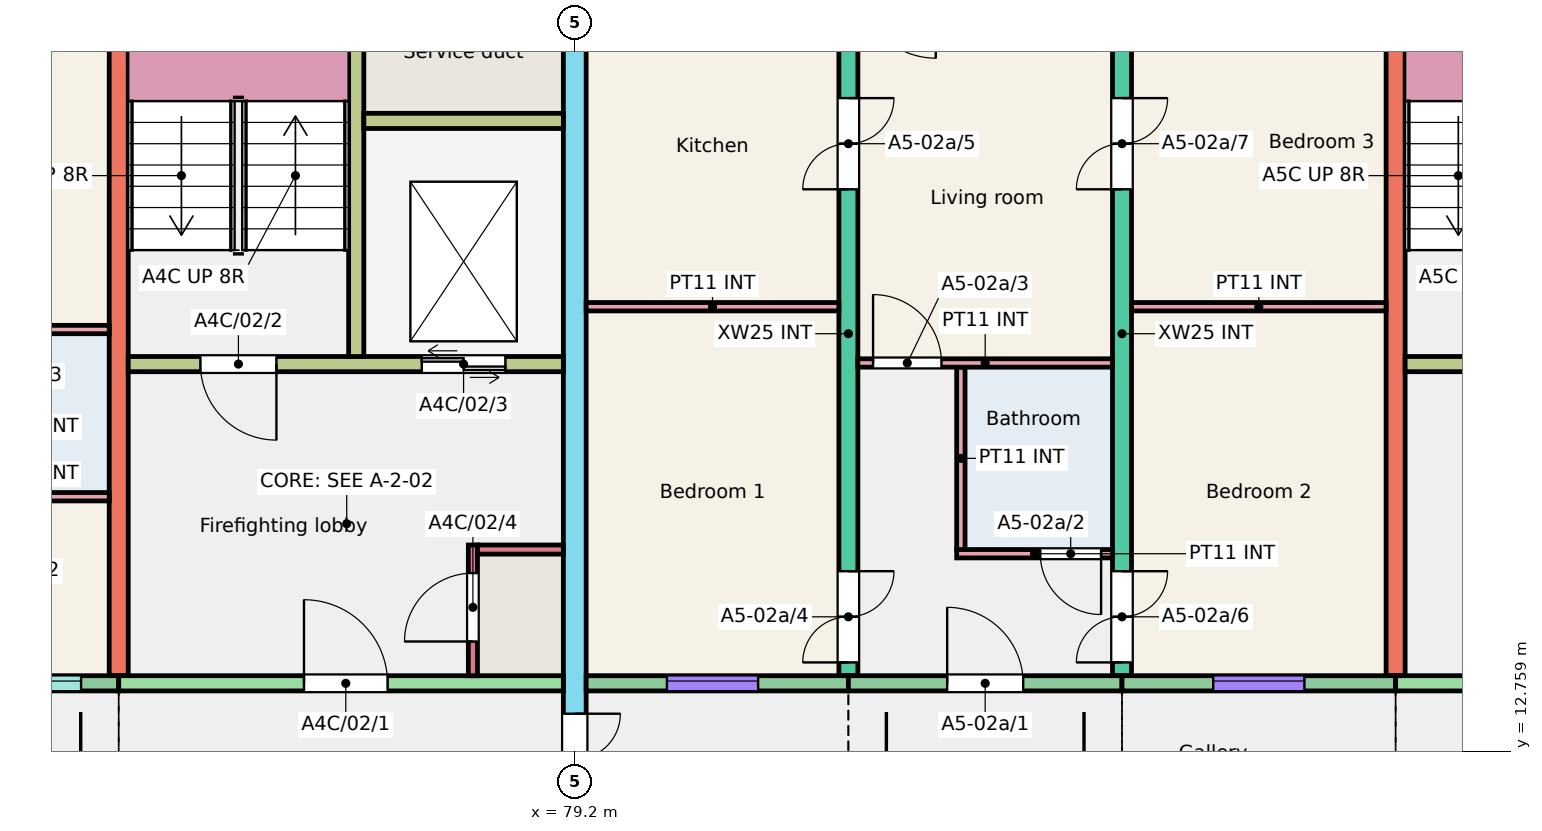
"""IFC4 building model, lengths in metres.
Left out: names, types, materials, properties, quantities, classifications, styles, units other than length and angle.
Written with IfcOpenShell. Run it as: python <this file> out.ifc"""

import sys

from ifc_helpers import new_model, si_unit, direction, frame, frame_2d, origin, place, context, subcontext, project, spatial, rectangle, extrude, element, fill, save


model = new_model("IFC4")
c1 = context("Model", 3, precision=1e-05, world=origin(), true_north=direction((0.0, 1.0)))
c2 = subcontext(c1, "Body", "Model", "MODEL_VIEW")
j1 = project(units=[si_unit("LENGTHUNIT", "METRE"), si_unit("PLANEANGLEUNIT", "RADIAN")], contexts=[c1])
p1 = place(None, origin())
s1 = spatial("IfcSite", under=j1, at=p1, CompositionType="ELEMENT")
p2 = place(p1, origin())
s2 = spatial("IfcBuilding", under=s1, at=p2, CompositionType="ELEMENT")
p3 = place(p2, frame((0.0, 0.0, 6.0)))
s3 = spatial("IfcBuildingStorey", under=s2, at=p3, CompositionType="ELEMENT", Elevation=6.0)
p4 = place(p3, frame((73.2, 13.75, 0.0), z_axis=(0.0, 0.0, 1.0), x_axis=(0.0, 1.0, 0.0)))
e1 = element("IfcWall", 1, at=p4, inside=s3, PredefinedType="SHEAR", context=c2, shape_type="SweptSolid", body=[
    extrude(rectangle(XDim=9.0, YDim=0.25, at=frame_2d((4.5, 0.0))), origin(), (0.0, 0.0, 1.0), 3.0),
])
p5 = place(p3, frame((79.2, 11.75, 0.0), z_axis=(0.0, 0.0, 1.0), x_axis=(0.0, 1.0, 0.0)))
e2 = element("IfcWall", 2, at=p5, inside=s3, PredefinedType="SHEAR", context=c2, shape_type="SweptSolid", body=[
    extrude(rectangle(XDim=11.0, YDim=0.3, at=frame_2d((5.5, 0.0))), origin(), (0.0, 0.0, 1.0), 3.0),
])
p6 = place(p5, frame((0.3, 0.0, 0.0)))
e3 = element("IfcOpeningElement", 3, at=p6, cuts=e2, PredefinedType="OPENING", context=c2, shape_type="SweptSolid", body=[
    extrude(rectangle(XDim=1.2, YDim=2.1, at=frame_2d((0.6, 1.05))), frame((0.0, 0.16, 0.0), z_axis=(0.0, -1.0, 0.0), x_axis=(1.0, 0.0, 0.0)), (0.0, 0.0, 1.0), 0.32),
])
p7 = place(p3, frame((82.8, 13.75, 0.0), z_axis=(0.0, 0.0, 1.0), x_axis=(0.0, 1.0, 0.0)))
e4 = element("IfcWall", 4, at=p7, inside=s3, PredefinedType="SHEAR", context=c2, shape_type="SweptSolid", body=[
    extrude(rectangle(XDim=9.0, YDim=0.25, at=frame_2d((4.5, 0.0))), origin(), (0.0, 0.0, 1.0), 3.0),
])
p8 = place(p7, frame((0.175, 0.0, 0.0)))
e5 = element("IfcOpeningElement", 5, at=p8, cuts=e4, PredefinedType="OPENING", context=c2, shape_type="SweptSolid", body=[
    extrude(rectangle(XDim=1.2, YDim=2.1, at=frame_2d((0.6, 1.05))), frame((0.0, 0.135, 0.0), z_axis=(0.0, -1.0, 0.0), x_axis=(1.0, 0.0, 0.0)), (0.0, 0.0, 1.0), 0.27),
])
p9 = place(p7, frame((6.4, 0.0, 0.0)))
e6 = element("IfcOpeningElement", 6, at=p9, cuts=e4, PredefinedType="OPENING", context=c2, shape_type="SweptSolid", body=[
    extrude(rectangle(XDim=1.2, YDim=2.1, at=frame_2d((0.6, 1.05))), frame((0.0, 0.135, 0.0), z_axis=(0.0, -1.0, 0.0), x_axis=(1.0, 0.0, 0.0)), (0.0, 0.0, 1.0), 0.27),
])
p10 = place(p3, frame((86.4, 13.75, 0.0), z_axis=(0.0, 0.0, 1.0), x_axis=(0.0, 1.0, 0.0)))
e7 = element("IfcWall", 7, at=p10, inside=s3, PredefinedType="SHEAR", context=c2, shape_type="SweptSolid", body=[
    extrude(rectangle(XDim=9.0, YDim=0.25, at=frame_2d((4.5, 0.0))), origin(), (0.0, 0.0, 1.0), 3.0),
])
p11 = place(p10, frame((0.175, 0.0, 0.0)))
e8 = element("IfcOpeningElement", 8, at=p11, cuts=e7, PredefinedType="OPENING", context=c2, shape_type="SweptSolid", body=[
    extrude(rectangle(XDim=1.2, YDim=2.1, at=frame_2d((0.6, 1.05))), frame((0.0, 0.135, 0.0), z_axis=(0.0, -1.0, 0.0), x_axis=(1.0, 0.0, 0.0)), (0.0, 0.0, 1.0), 0.27),
])
p12 = place(p10, frame((6.4, 0.0, 0.0)))
e9 = element("IfcOpeningElement", 9, at=p12, cuts=e7, PredefinedType="OPENING", context=c2, shape_type="SweptSolid", body=[
    extrude(rectangle(XDim=1.2, YDim=2.1, at=frame_2d((0.6, 1.05))), frame((0.0, 0.135, 0.0), z_axis=(0.0, -1.0, 0.0), x_axis=(1.0, 0.0, 0.0)), (0.0, 0.0, 1.0), 0.27),
])
p13 = place(p3, frame((90.0, 13.75, 0.0), z_axis=(0.0, 0.0, 1.0), x_axis=(0.0, 1.0, 0.0)))
e10 = element("IfcWall", 10, at=p13, inside=s3, PredefinedType="SHEAR", context=c2, shape_type="SweptSolid", body=[
    extrude(rectangle(XDim=9.0, YDim=0.25, at=frame_2d((4.5, 0.0))), origin(), (0.0, 0.0, 1.0), 3.0),
])
p14 = place(p3, frame((69.6, 13.65, 0.0), z_axis=(0.0, 0.0, 1.0), x_axis=(1.0, 0.0, 0.0)))
e11 = element("IfcWall", 11, at=p14, inside=s3, PredefinedType="SOLIDWALL", context=c2, shape_type="SweptSolid", body=[
    extrude(rectangle(XDim=3.6, YDim=0.2, at=frame_2d((1.8, 0.0))), origin(), (0.0, 0.0, 1.0), 3.0),
])
p15 = place(p14, frame((1.905, 0.0, 1.1)))
e12 = element("IfcOpeningElement", 12, at=p15, cuts=e11, PredefinedType="OPENING", context=c2, shape_type="SweptSolid", body=[
    extrude(rectangle(XDim=1.2, YDim=1.3, at=frame_2d((0.6, 0.65))), frame((0.0, 0.11, 0.0), z_axis=(0.0, -1.0, 0.0), x_axis=(1.0, 0.0, 0.0)), (0.0, 0.0, 1.0), 0.22),
])
p16 = place(p14, frame((0.275, 0.0, 0.0)))
e13 = element("IfcOpeningElement", 13, at=p16, cuts=e11, PredefinedType="OPENING", context=c2, shape_type="SweptSolid", body=[
    extrude(rectangle(XDim=1.0, YDim=2.1, at=frame_2d((0.5, 1.05))), frame((0.0, 0.11, 0.0), z_axis=(0.0, -1.0, 0.0), x_axis=(1.0, 0.0, 0.0)), (0.0, 0.0, 1.0), 0.22),
])
p17 = place(p3, frame((73.2, 13.65, 0.0), z_axis=(0.0, 0.0, 1.0), x_axis=(1.0, 0.0, 0.0)))
e14 = element("IfcWall", 14, at=p17, inside=s3, PredefinedType="SHEAR", context=c2, shape_type="SweptSolid", body=[
    extrude(rectangle(XDim=5.85, YDim=0.2, at=frame_2d((2.925, 0.0))), origin(), (0.0, 0.0, 1.0), 3.0),
])
p18 = place(p17, frame((2.438, 0.0, 0.0)))
e15 = element("IfcOpeningElement", 15, at=p18, cuts=e14, PredefinedType="OPENING", context=c2, shape_type="SweptSolid", body=[
    extrude(rectangle(XDim=1.1, YDim=2.1, at=frame_2d((0.55, 1.05))), frame((0.0, 0.11, 0.0), z_axis=(0.0, -1.0, 0.0), x_axis=(1.0, 0.0, 0.0)), (0.0, 0.0, 1.0), 0.22),
])
p19 = place(p3, frame((73.325, 17.85, 0.0), z_axis=(0.0, 0.0, 1.0), x_axis=(1.0, 0.0, 0.0)))
e16 = element("IfcWall", 16, at=p19, inside=s3, PredefinedType="SHEAR", context=c2, shape_type="SweptSolid", body=[
    extrude(rectangle(XDim=5.725, YDim=0.2, at=frame_2d((2.863, 0.0))), origin(), (0.0, 0.0, 1.0), 3.0),
])
p20 = place(p19, frame((0.95, 0.0, 0.0)))
e17 = element("IfcOpeningElement", 17, at=p20, cuts=e16, PredefinedType="OPENING", context=c2, shape_type="SweptSolid", body=[
    extrude(rectangle(XDim=1.0, YDim=2.1, at=frame_2d((0.5, 1.05))), frame((0.0, 0.11, 0.0), z_axis=(0.0, -1.0, 0.0), x_axis=(1.0, 0.0, 0.0)), (0.0, 0.0, 1.0), 0.22),
])
p21 = place(p19, frame((3.863, 0.0, 0.0)))
e18 = element("IfcOpeningElement", 18, at=p21, cuts=e16, PredefinedType="OPENING", context=c2, shape_type="SweptSolid", body=[
    extrude(rectangle(XDim=1.1, YDim=2.1, at=frame_2d((0.55, 1.05))), frame((0.0, 0.11, 0.0), z_axis=(0.0, -1.0, 0.0), x_axis=(1.0, 0.0, 0.0)), (0.0, 0.0, 1.0), 0.22),
])
p22 = place(p3, frame((76.325, 17.95, 0.0), z_axis=(0.0, 0.0, 1.0), x_axis=(0.0, 1.0, 0.0)))
e19 = element("IfcWall", 19, at=p22, inside=s3, PredefinedType="SHEAR", context=c2, shape_type="SweptSolid", body=[
    extrude(rectangle(XDim=4.8, YDim=0.2, at=frame_2d((2.4, 0.0))), origin(), (0.0, 0.0, 1.0), 3.0),
])
p23 = place(p3, frame((76.425, 21.05, 0.0), z_axis=(0.0, 0.0, 1.0), x_axis=(1.0, 0.0, 0.0)))
e20 = element("IfcWall", 20, at=p23, inside=s3, PredefinedType="SHEAR", context=c2, shape_type="SweptSolid", body=[
    extrude(rectangle(XDim=2.625, YDim=0.2, at=frame_2d((1.312, 0.0))), origin(), (0.0, 0.0, 1.0), 3.0),
])
p24 = place(p3, frame((77.86, 13.75, 0.0), z_axis=(0.0, 0.0, 1.0), x_axis=(0.0, 1.0, 0.0)))
e21 = element("IfcWall", 21, at=p24, inside=s3, PredefinedType="SHEAR", context=c2, shape_type="SweptSolid", body=[
    extrude(rectangle(XDim=1.72, YDim=0.12, at=frame_2d((0.86, 0.0))), origin(), (0.0, 0.0, 1.0), 3.0),
])
p25 = place(p24, frame((0.45, 0.0, 0.0)))
e22 = element("IfcOpeningElement", 22, at=p25, cuts=e21, PredefinedType="OPENING", context=c2, shape_type="SweptSolid", body=[
    extrude(rectangle(XDim=0.9, YDim=2.1, at=frame_2d((0.45, 1.05))), frame((0.0, 0.07, 0.0), z_axis=(0.0, -1.0, 0.0), x_axis=(1.0, 0.0, 0.0)), (0.0, 0.0, 1.0), 0.14),
])
p26 = place(p3, frame((77.92, 15.41, 0.0), z_axis=(0.0, 0.0, 1.0), x_axis=(1.0, 0.0, 0.0)))
e23 = element("IfcWall", 23, at=p26, inside=s3, PredefinedType="SHEAR", context=c2, shape_type="SweptSolid", body=[
    extrude(rectangle(XDim=1.13, YDim=0.12, at=frame_2d((0.565, 0.0))), origin(), (0.0, 0.0, 1.0), 3.0),
])
p27 = place(p3, frame((79.35, 13.65, 0.0), z_axis=(0.0, 0.0, 1.0), x_axis=(1.0, 0.0, 0.0)))
e24 = element("IfcWall", 24, at=p27, inside=s3, PredefinedType="SOLIDWALL", context=c2, shape_type="SweptSolid", body=[
    extrude(rectangle(XDim=3.45, YDim=0.2, at=frame_2d((1.725, 0.0))), origin(), (0.0, 0.0, 1.0), 3.0),
])
p28 = place(p27, frame((1.062, 0.0, 0.8)))
e25 = element("IfcOpeningElement", 25, at=p28, cuts=e24, PredefinedType="OPENING", context=c2, shape_type="SweptSolid", body=[
    extrude(rectangle(XDim=1.2, YDim=1.6, at=frame_2d((0.6, 0.8))), frame((0.0, 0.11, 0.0), z_axis=(0.0, -1.0, 0.0), x_axis=(1.0, 0.0, 0.0)), (0.0, 0.0, 1.0), 0.22),
])
p29 = place(p3, frame((82.8, 13.65, 0.0), z_axis=(0.0, 0.0, 1.0), x_axis=(1.0, 0.0, 0.0)))
e26 = element("IfcWall", 26, at=p29, inside=s3, PredefinedType="SOLIDWALL", context=c2, shape_type="SweptSolid", body=[
    extrude(rectangle(XDim=3.6, YDim=0.2, at=frame_2d((1.8, 0.0))), origin(), (0.0, 0.0, 1.0), 3.0),
])
p30 = place(p29, frame((1.3, 0.0, 0.0)))
e27 = element("IfcOpeningElement", 27, at=p30, cuts=e26, PredefinedType="OPENING", context=c2, shape_type="SweptSolid", body=[
    extrude(rectangle(XDim=1.0, YDim=2.1, at=frame_2d((0.5, 1.05))), frame((0.0, 0.11, 0.0), z_axis=(0.0, -1.0, 0.0), x_axis=(1.0, 0.0, 0.0)), (0.0, 0.0, 1.0), 0.22),
])
p31 = place(p3, frame((86.4, 13.65, 0.0), z_axis=(0.0, 0.0, 1.0), x_axis=(1.0, 0.0, 0.0)))
e28 = element("IfcWall", 28, at=p31, inside=s3, PredefinedType="SOLIDWALL", context=c2, shape_type="SweptSolid", body=[
    extrude(rectangle(XDim=3.6, YDim=0.2, at=frame_2d((1.8, 0.0))), origin(), (0.0, 0.0, 1.0), 3.0),
])
p32 = place(p31, frame((1.2, 0.0, 0.8)))
e29 = element("IfcOpeningElement", 29, at=p32, cuts=e28, PredefinedType="OPENING", context=c2, shape_type="SweptSolid", body=[
    extrude(rectangle(XDim=1.2, YDim=1.6, at=frame_2d((0.6, 0.8))), frame((0.0, 0.11, 0.0), z_axis=(0.0, -1.0, 0.0), x_axis=(1.0, 0.0, 0.0)), (0.0, 0.0, 1.0), 0.22),
])
p33 = place(p3, frame((90.0, 13.65, 0.0), z_axis=(0.0, 0.0, 1.0), x_axis=(1.0, 0.0, 0.0)))
e30 = element("IfcWall", 30, at=p33, inside=s3, PredefinedType="SHEAR", context=c2, shape_type="SweptSolid", body=[
    extrude(rectangle(XDim=5.85, YDim=0.2, at=frame_2d((2.925, 0.0))), origin(), (0.0, 0.0, 1.0), 3.0),
])
p34 = place(p33, frame((2.438, 0.0, 0.0)))
e31 = element("IfcOpeningElement", 31, at=p34, cuts=e30, PredefinedType="OPENING", context=c2, shape_type="SweptSolid", body=[
    extrude(rectangle(XDim=1.1, YDim=2.1, at=frame_2d((0.55, 1.05))), frame((0.0, 0.11, 0.0), z_axis=(0.0, -1.0, 0.0), x_axis=(1.0, 0.0, 0.0)), (0.0, 0.0, 1.0), 0.22),
])
p35 = place(p3, frame((90.125, 17.85, 0.0), z_axis=(0.0, 0.0, 1.0), x_axis=(1.0, 0.0, 0.0)))
e32 = element("IfcWall", 32, at=p35, inside=s3, PredefinedType="SHEAR", context=c2, shape_type="SweptSolid", body=[
    extrude(rectangle(XDim=5.725, YDim=0.2, at=frame_2d((2.863, 0.0))), origin(), (0.0, 0.0, 1.0), 3.0),
])
p36 = place(p35, frame((0.95, 0.0, 0.0)))
e33 = element("IfcOpeningElement", 33, at=p36, cuts=e32, PredefinedType="OPENING", context=c2, shape_type="SweptSolid", body=[
    extrude(rectangle(XDim=1.0, YDim=2.1, at=frame_2d((0.5, 1.05))), frame((0.0, 0.11, 0.0), z_axis=(0.0, -1.0, 0.0), x_axis=(1.0, 0.0, 0.0)), (0.0, 0.0, 1.0), 0.22),
])
p37 = place(p35, frame((3.863, 0.0, 0.0)))
e34 = element("IfcOpeningElement", 34, at=p37, cuts=e32, PredefinedType="OPENING", context=c2, shape_type="SweptSolid", body=[
    extrude(rectangle(XDim=1.1, YDim=2.1, at=frame_2d((0.55, 1.05))), frame((0.0, 0.11, 0.0), z_axis=(0.0, -1.0, 0.0), x_axis=(1.0, 0.0, 0.0)), (0.0, 0.0, 1.0), 0.22),
])
p38 = place(p3, frame((71.135, 16.105, 0.0), z_axis=(0.0, 0.0, 1.0), x_axis=(1.0, 0.0, 0.0)))
e35 = element("IfcWall", 35, at=p38, inside=s3, PredefinedType="PARTITIONING", context=c2, shape_type="SweptSolid", body=[
    extrude(rectangle(XDim=1.94, YDim=0.11, at=frame_2d((0.97, 0.0))), origin(), (0.0, 0.0, 1.0), 2.8),
])
p39 = place(p3, frame((69.725, 18.305, 0.0), z_axis=(0.0, 0.0, 1.0), x_axis=(1.0, 0.0, 0.0)))
e36 = element("IfcWall", 36, at=p39, inside=s3, PredefinedType="PARTITIONING", context=c2, shape_type="SweptSolid", body=[
    extrude(rectangle(XDim=3.35, YDim=0.11, at=frame_2d((1.675, 0.0))), origin(), (0.0, 0.0, 1.0), 2.8),
])
p40 = place(p39, frame((0.2, 0.0, 0.0)))
e37 = element("IfcOpeningElement", 37, at=p40, cuts=e36, PredefinedType="OPENING", context=c2, shape_type="SweptSolid", body=[
    extrude(rectangle(XDim=0.9, YDim=2.1, at=frame_2d((0.45, 1.05))), frame((0.0, 0.065, 0.0), z_axis=(0.0, -1.0, 0.0), x_axis=(1.0, 0.0, 0.0)), (0.0, 0.0, 1.0), 0.13),
])
p41 = place(p3, frame((84.225, 15.355, 0.0), z_axis=(0.0, 0.0, 1.0), x_axis=(1.0, 0.0, 0.0)))
e38 = element("IfcWall", 38, at=p41, inside=s3, PredefinedType="PARTITIONING", context=c2, shape_type="SweptSolid", body=[
    extrude(rectangle(XDim=2.05, YDim=0.11, at=frame_2d((1.025, 0.0))), origin(), (0.0, 0.0, 1.0), 2.8),
])
p42 = place(p41, frame((1.1, 0.0, 0.0)))
e39 = element("IfcOpeningElement", 39, at=p42, cuts=e38, PredefinedType="OPENING", context=c2, shape_type="SweptSolid", body=[
    extrude(rectangle(XDim=0.8, YDim=2.1, at=frame_2d((0.4, 1.05))), frame((0.0, 0.065, 0.0), z_axis=(0.0, -1.0, 0.0), x_axis=(1.0, 0.0, 0.0)), (0.0, 0.0, 1.0), 0.13),
])
p43 = place(p3, frame((84.28, 15.41, 0.0), z_axis=(0.0, 0.0, 1.0), x_axis=(0.0, 1.0, 0.0)))
e40 = element("IfcWall", 40, at=p43, inside=s3, PredefinedType="PARTITIONING", context=c2, shape_type="SweptSolid", body=[
    extrude(rectangle(XDim=2.4, YDim=0.11, at=frame_2d((1.2, 0.0))), origin(), (0.0, 0.0, 1.0), 2.8),
])
p44 = place(p3, frame((82.925, 17.865, 0.0), z_axis=(0.0, 0.0, 1.0), x_axis=(1.0, 0.0, 0.0)))
e41 = element("IfcWall", 41, at=p44, inside=s3, PredefinedType="PARTITIONING", context=c2, shape_type="SweptSolid", body=[
    extrude(rectangle(XDim=3.35, YDim=0.11, at=frame_2d((1.675, 0.0))), origin(), (0.0, 0.0, 1.0), 2.8),
])
p45 = place(p44, frame((0.2, 0.0, 0.0)))
e42 = element("IfcOpeningElement", 42, at=p45, cuts=e41, PredefinedType="OPENING", context=c2, shape_type="SweptSolid", body=[
    extrude(rectangle(XDim=0.9, YDim=2.1, at=frame_2d((0.45, 1.05))), frame((0.0, 0.065, 0.0), z_axis=(0.0, -1.0, 0.0), x_axis=(1.0, 0.0, 0.0)), (0.0, 0.0, 1.0), 0.13),
])
p46 = place(p3, frame((79.35, 18.605, 0.0), z_axis=(0.0, 0.0, 1.0), x_axis=(1.0, 0.0, 0.0)))
e43 = element("IfcWall", 43, at=p46, inside=s3, PredefinedType="PARTITIONING", context=c2, shape_type="SweptSolid", body=[
    extrude(rectangle(XDim=3.325, YDim=0.11, at=frame_2d((1.663, 0.0))), origin(), (0.0, 0.0, 1.0), 2.8),
])
p47 = place(p3, frame((86.525, 18.605, 0.0), z_axis=(0.0, 0.0, 1.0), x_axis=(1.0, 0.0, 0.0)))
e44 = element("IfcWall", 44, at=p47, inside=s3, PredefinedType="PARTITIONING", context=c2, shape_type="SweptSolid", body=[
    extrude(rectangle(XDim=3.35, YDim=0.11, at=frame_2d((1.675, 0.0))), origin(), (0.0, 0.0, 1.0), 2.8),
])
p48 = place(p15, origin())
e45 = element("IfcWindow", 45, at=p48, inside=s3, PartitioningType="SINGLE_PANEL", PredefinedType="WINDOW", context=c2, shape_type="SweptSolid", body=[
    extrude(rectangle(XDim=1.2, YDim=1.3, at=frame_2d((0.6, 0.65))), frame((0.0, 0.06, 0.0), z_axis=(0.0, -1.0, 0.0), x_axis=(1.0, 0.0, 0.0)), (0.0, 0.0, 1.0), 0.06),
])
fill(e12, e45)
p49 = place(p28, origin())
e46 = element("IfcWindow", 46, at=p49, inside=s3, PartitioningType="SINGLE_PANEL", PredefinedType="WINDOW", context=c2, shape_type="SweptSolid", body=[
    extrude(rectangle(XDim=1.2, YDim=1.6, at=frame_2d((0.6, 0.8))), frame((0.0, 0.06, 0.0), z_axis=(0.0, -1.0, 0.0), x_axis=(1.0, 0.0, 0.0)), (0.0, 0.0, 1.0), 0.06),
])
fill(e25, e46)
p50 = place(p32, origin())
e47 = element("IfcWindow", 47, at=p50, inside=s3, PartitioningType="SINGLE_PANEL", PredefinedType="WINDOW", context=c2, shape_type="SweptSolid", body=[
    extrude(rectangle(XDim=1.2, YDim=1.6, at=frame_2d((0.6, 0.8))), frame((0.0, 0.06, 0.0), z_axis=(0.0, -1.0, 0.0), x_axis=(1.0, 0.0, 0.0)), (0.0, 0.0, 1.0), 0.06),
])
fill(e29, e47)
p51 = place(p30, origin())
e48 = element("IfcDoor", 48, at=p51, inside=s3, OperationType="SINGLE_SWING_LEFT", PredefinedType="DOOR", context=c2, shape_type="SweptSolid", body=[
    extrude(rectangle(XDim=1.0, YDim=2.1, at=frame_2d((0.5, 1.05))), frame((0.0, 0.025, 0.0), z_axis=(0.0, -1.0, 0.0), x_axis=(1.0, 0.0, 0.0)), (0.0, 0.0, 1.0), 0.05),
])
fill(e27, e48)
p52 = place(p42, origin())
e49 = element("IfcDoor", 49, at=p52, inside=s3, OperationType="SINGLE_SWING_RIGHT", PredefinedType="DOOR", context=c2, shape_type="SweptSolid", body=[
    extrude(rectangle(XDim=0.8, YDim=2.1, at=frame_2d((0.4, 1.05))), frame((0.0, 0.025, 0.0), z_axis=(0.0, -1.0, 0.0), x_axis=(1.0, 0.0, 0.0)), (0.0, 0.0, 1.0), 0.05),
])
fill(e39, e49)
p53 = place(p45, origin())
e50 = element("IfcDoor", 50, at=p53, inside=s3, OperationType="SINGLE_SWING_LEFT", PredefinedType="DOOR", context=c2, shape_type="SweptSolid", body=[
    extrude(rectangle(XDim=0.9, YDim=2.1, at=frame_2d((0.45, 1.05))), frame((0.0, 0.025, 0.0), z_axis=(0.0, -1.0, 0.0), x_axis=(1.0, 0.0, 0.0)), (0.0, 0.0, 1.0), 0.05),
])
fill(e42, e50)
p54 = place(p8, origin())
e51 = element("IfcDoor", 51, at=p54, inside=s3, OperationType="DOUBLE_DOOR_SINGLE_SWING", PredefinedType="DOOR", context=c2, shape_type="SweptSolid", body=[
    extrude(rectangle(XDim=1.2, YDim=2.1, at=frame_2d((0.6, 1.05))), frame((0.0, 0.025, 0.0), z_axis=(0.0, -1.0, 0.0), x_axis=(1.0, 0.0, 0.0)), (0.0, 0.0, 1.0), 0.05),
])
fill(e5, e51)
p55 = place(p9, origin())
e52 = element("IfcDoor", 52, at=p55, inside=s3, OperationType="DOUBLE_DOOR_SINGLE_SWING", PredefinedType="DOOR", context=c2, shape_type="SweptSolid", body=[
    extrude(rectangle(XDim=1.2, YDim=2.1, at=frame_2d((0.6, 1.05))), frame((0.0, 0.025, 0.0), z_axis=(0.0, -1.0, 0.0), x_axis=(1.0, 0.0, 0.0)), (0.0, 0.0, 1.0), 0.05),
])
fill(e6, e52)
p56 = place(p11, origin())
e53 = element("IfcDoor", 53, at=p56, inside=s3, OperationType="DOUBLE_DOOR_SINGLE_SWING", PredefinedType="DOOR", context=c2, shape_type="SweptSolid", body=[
    extrude(rectangle(XDim=1.2, YDim=2.1, at=frame_2d((0.6, 1.05))), frame((0.0, 0.025, 0.0), z_axis=(0.0, -1.0, 0.0), x_axis=(1.0, 0.0, 0.0)), (0.0, 0.0, 1.0), 0.05),
])
fill(e8, e53)
p57 = place(p12, origin())
e54 = element("IfcDoor", 54, at=p57, inside=s3, OperationType="DOUBLE_DOOR_SINGLE_SWING", PredefinedType="DOOR", context=c2, shape_type="SweptSolid", body=[
    extrude(rectangle(XDim=1.2, YDim=2.1, at=frame_2d((0.6, 1.05))), frame((0.0, 0.025, 0.0), z_axis=(0.0, -1.0, 0.0), x_axis=(1.0, 0.0, 0.0)), (0.0, 0.0, 1.0), 0.05),
])
fill(e9, e54)
p58 = place(p18, origin())
e55 = element("IfcDoor", 55, at=p58, inside=s3, OperationType="SINGLE_SWING_LEFT", PredefinedType="DOOR", context=c2, shape_type="SweptSolid", body=[
    extrude(rectangle(XDim=1.1, YDim=2.1, at=frame_2d((0.55, 1.05))), frame((0.0, 0.025, 0.0), z_axis=(0.0, -1.0, 0.0), x_axis=(1.0, 0.0, 0.0)), (0.0, 0.0, 1.0), 0.05),
])
fill(e15, e55)
p59 = place(p20, origin())
e56 = element("IfcDoor", 56, at=p59, inside=s3, OperationType="SINGLE_SWING_RIGHT", PredefinedType="DOOR", context=c2, shape_type="SweptSolid", body=[
    extrude(rectangle(XDim=1.0, YDim=2.1, at=frame_2d((0.5, 1.05))), frame((0.0, 0.025, 0.0), z_axis=(0.0, -1.0, 0.0), x_axis=(1.0, 0.0, 0.0)), (0.0, 0.0, 1.0), 0.05),
])
fill(e17, e56)
p60 = place(p21, origin())
e57 = element("IfcDoor", 57, at=p60, inside=s3, OperationType="DOUBLE_DOOR_SLIDING", PredefinedType="DOOR", context=c2, shape_type="SweptSolid", body=[
    extrude(rectangle(XDim=1.1, YDim=2.1, at=frame_2d((0.55, 1.05))), frame((0.0, 0.025, 0.0), z_axis=(0.0, -1.0, 0.0), x_axis=(1.0, 0.0, 0.0)), (0.0, 0.0, 1.0), 0.05),
])
fill(e18, e57)
p61 = place(p25, origin())
e58 = element("IfcDoor", 58, at=p61, inside=s3, OperationType="SINGLE_SWING_LEFT", PredefinedType="DOOR", context=c2, shape_type="SweptSolid", body=[
    extrude(rectangle(XDim=0.9, YDim=2.1, at=frame_2d((0.45, 1.05))), frame((0.0, 0.025, 0.0), z_axis=(0.0, -1.0, 0.0), x_axis=(1.0, 0.0, 0.0)), (0.0, 0.0, 1.0), 0.05),
])
fill(e22, e58)
p62 = place(p6, origin())
e59 = element("IfcDoor", 59, at=p62, inside=s3, OperationType="DOUBLE_DOOR_SINGLE_SWING", PredefinedType="DOOR", context=c2, shape_type="SweptSolid", body=[
    extrude(rectangle(XDim=1.2, YDim=2.1, at=frame_2d((0.6, 1.05))), frame((0.0, 0.025, 0.0), z_axis=(0.0, -1.0, 0.0), x_axis=(1.0, 0.0, 0.0)), (0.0, 0.0, 1.0), 0.05),
])
fill(e3, e59)
save(model, sys.argv[1])
